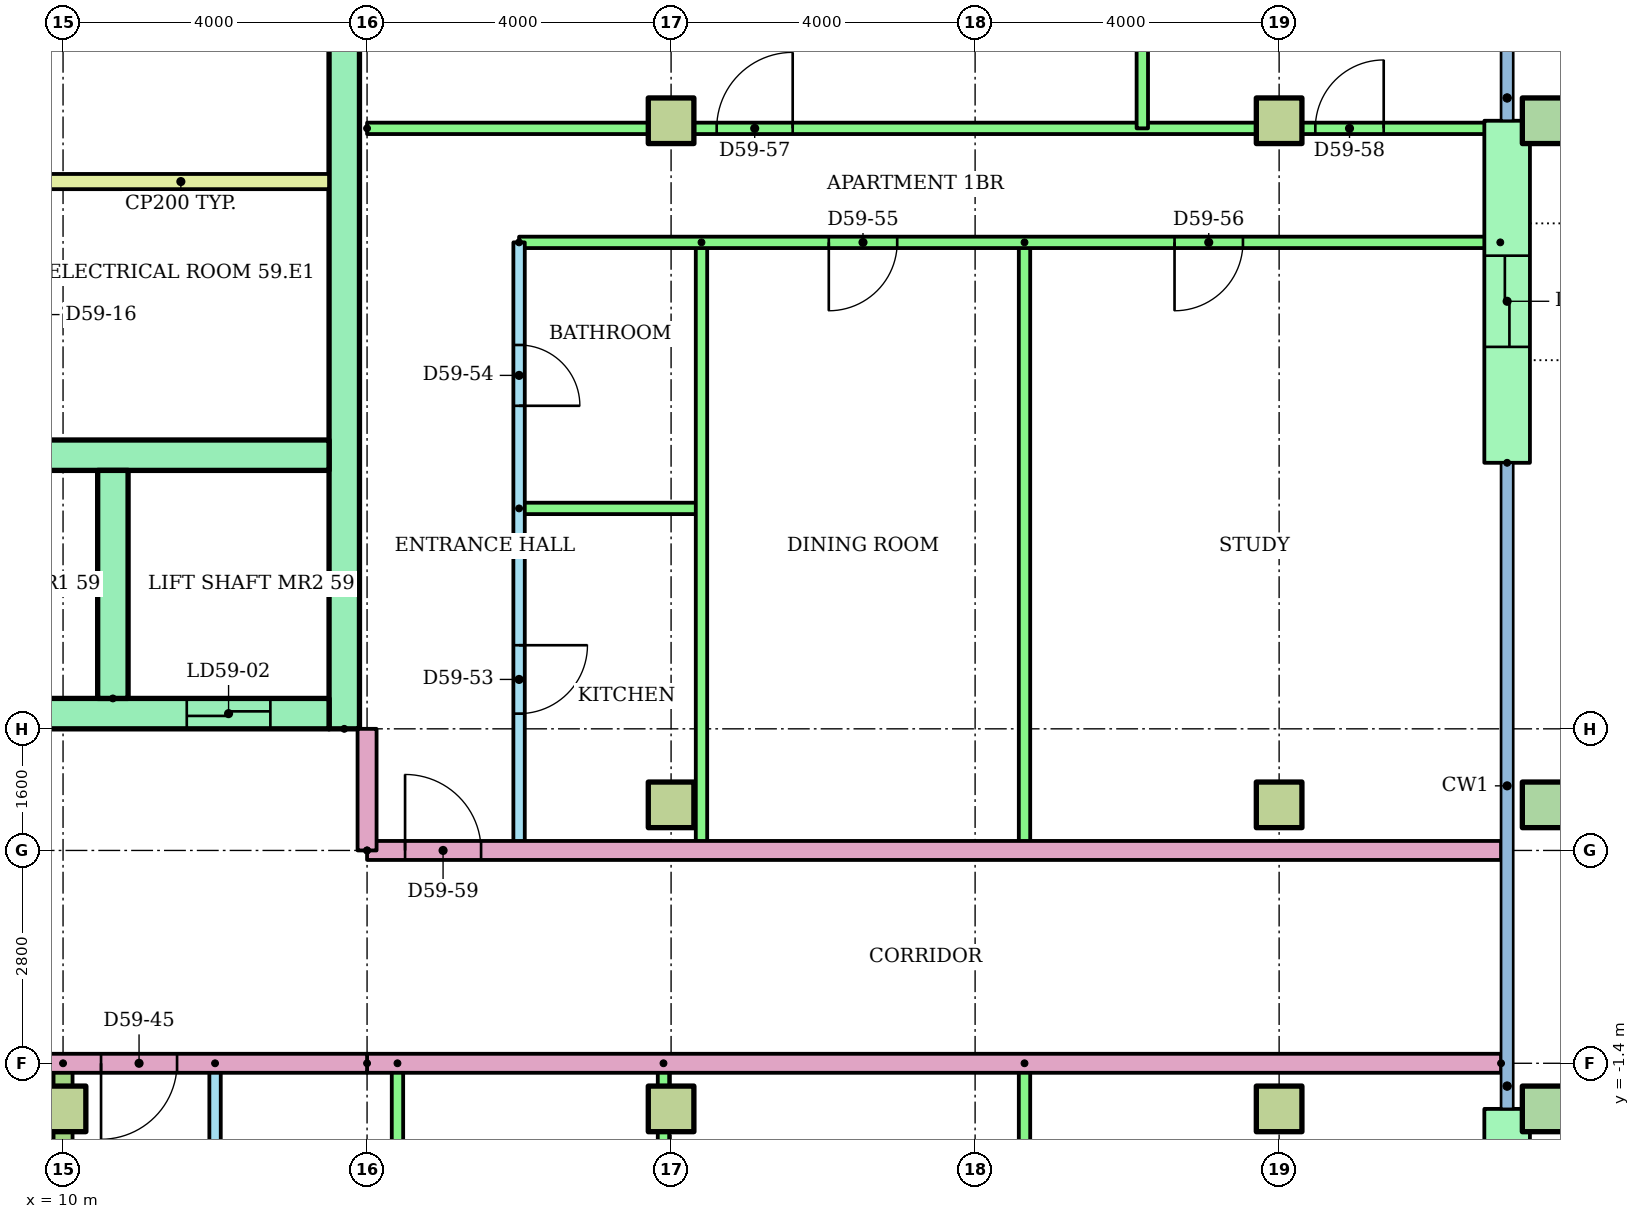
"""IFC4 building model, lengths in metres.
Left out: names, types, materials, properties, quantities, classifications, styles, units other than length and angle.
Written with IfcOpenShell. Run it as: python <this file> out.ifc"""

import sys

from ifc_helpers import new_model, si_unit, direction, frame, frame_2d, origin, origin_2d, place, context, subcontext, project, spatial, rectangle, hollow_rectangle, extrude, element, fill, save


model = new_model("IFC4")
c1 = context("Model", 3, precision=1e-05, world=origin(), true_north=direction((0.0, 1.0)))
c2 = subcontext(c1, "Body", "Model", "MODEL_VIEW")
j1 = project(units=[si_unit("LENGTHUNIT", "METRE"), si_unit("PLANEANGLEUNIT", "RADIAN")], contexts=[c1])
p1 = place(None, origin())
s1 = spatial("IfcSite", under=j1, at=p1, CompositionType="ELEMENT")
p2 = place(p1, origin())
s2 = spatial("IfcBuilding", under=s1, at=p2, CompositionType="ELEMENT")
p3 = place(p2, frame((0.0, 0.0, 226.8)))
s3 = spatial("IfcBuildingStorey", under=s2, at=p3, CompositionType="ELEMENT", Elevation=226.8)
for number, where in (
    (1, (10.0, -2.0, 0.0)),
    (2, (18.0, -2.0, 0.0)),
    (3, (26.0, -2.0, 0.0)),
):
    element("IfcColumn", number, at=place(p3, frame(where)), inside=s3, PredefinedType="COLUMN", context=c2, shape_type="SweptSolid", body=[
        extrude(rectangle(XDim=0.6, YDim=0.6, at=origin_2d()), origin(), (0.0, 0.0, 1.0), 3.2),
    ])
p4 = place(p3, frame((29.5, -2.0, 0.0)))
e4 = element("IfcColumn", 4, at=p4, inside=s3, PredefinedType="COLUMN", context=c2, shape_type="SweptSolid", body=[
    extrude(hollow_rectangle(XDim=0.6, YDim=0.6, WallThickness=0.03, at=origin_2d()), origin(), (0.0, 0.0, 1.0), 3.2),
])
for number, where in (
    (5, (18.0, 2.0, 0.0)),
    (6, (26.0, 2.0, 0.0)),
):
    element("IfcColumn", number, at=place(p3, frame(where)), inside=s3, PredefinedType="COLUMN", context=c2, shape_type="SweptSolid", body=[
        extrude(rectangle(XDim=0.6, YDim=0.6, at=origin_2d()), origin(), (0.0, 0.0, 1.0), 3.2),
    ])
p5 = place(p3, frame((29.5, 2.0, 0.0)))
e7 = element("IfcColumn", 7, at=p5, inside=s3, PredefinedType="COLUMN", context=c2, shape_type="SweptSolid", body=[
    extrude(hollow_rectangle(XDim=0.6, YDim=0.6, WallThickness=0.03, at=origin_2d()), origin(), (0.0, 0.0, 1.0), 3.2),
])
for number, where in (
    (8, (18.0, 11.0, 0.0)),
    (9, (26.0, 11.0, 0.0)),
):
    element("IfcColumn", number, at=place(p3, frame(where)), inside=s3, PredefinedType="COLUMN", context=c2, shape_type="SweptSolid", body=[
        extrude(rectangle(XDim=0.6, YDim=0.6, at=origin_2d()), origin(), (0.0, 0.0, 1.0), 3.2),
    ])
p6 = place(p3, frame((29.5, 11.0, 0.0)))
e10 = element("IfcColumn", 10, at=p6, inside=s3, PredefinedType="COLUMN", context=c2, shape_type="SweptSolid", body=[
    extrude(hollow_rectangle(XDim=0.6, YDim=0.6, WallThickness=0.03, at=origin_2d()), origin(), (0.0, 0.0, 1.0), 3.2),
])
p7 = place(p3, frame((29.0, -5.7, 0.0), z_axis=(0.0, 0.0, 1.0), x_axis=(0.0, 1.0, 0.0)))
e11 = element("IfcWall", 11, at=p7, inside=s3, PredefinedType="STANDARD", context=c2, shape_type="SweptSolid", body=[
    extrude(rectangle(XDim=3.7, YDim=0.6, at=frame_2d((1.85, 0.0))), origin(), (0.0, 0.0, 1.0), 2.92),
])
p8 = place(p7, frame((1.25, 0.0, 0.0)))
e12 = element("IfcOpeningElement", 12, at=p8, cuts=e11, PredefinedType="OPENING", context=c2, shape_type="SweptSolid", body=[
    extrude(rectangle(XDim=1.2, YDim=2.1, at=frame_2d((0.6, 1.05))), frame((0.0, 0.31, 0.0), z_axis=(0.0, -1.0, 0.0), x_axis=(1.0, 0.0, 0.0)), (0.0, 0.0, 1.0), 0.62),
])
p9 = place(p3, frame((29.0, 6.5, 0.0), z_axis=(0.0, 0.0, 1.0), x_axis=(0.0, 1.0, 0.0)))
e13 = element("IfcWall", 13, at=p9, inside=s3, PredefinedType="STANDARD", context=c2, shape_type="SweptSolid", body=[
    extrude(rectangle(XDim=4.5, YDim=0.6, at=frame_2d((2.25, 0.0))), origin(), (0.0, 0.0, 1.0), 2.92),
])
p10 = place(p9, frame((1.525, 0.0, 0.0)))
e14 = element("IfcOpeningElement", 14, at=p10, cuts=e13, PredefinedType="OPENING", context=c2, shape_type="SweptSolid", body=[
    extrude(rectangle(XDim=1.2, YDim=2.1, at=frame_2d((0.6, 1.05))), frame((0.0, 0.31, 0.0), z_axis=(0.0, -1.0, 0.0), x_axis=(1.0, 0.0, 0.0)), (0.0, 0.0, 1.0), 0.62),
])
p11 = place(p3, frame((13.7, 3.0, 0.0), z_axis=(0.0, 0.0, 1.0), x_axis=(0.0, 1.0, 0.0)))
e15 = element("IfcWall", 15, at=p11, inside=s3, PredefinedType="SHEAR", context=c2, shape_type="SweptSolid", body=[
    extrude(rectangle(XDim=17.0, YDim=0.4, at=frame_2d((8.5, 0.0))), origin(), (0.0, 0.0, 1.0), 2.92),
])
p12 = place(p3, frame((-13.5, 3.2, 0.0)))
e16 = element("IfcWall", 16, at=p12, inside=s3, PredefinedType="SHEAR", context=c2, shape_type="SweptSolid", body=[
    extrude(rectangle(XDim=27.0, YDim=0.4, at=frame_2d((13.5, 0.0))), origin(), (0.0, 0.0, 1.0), 2.92),
])
p13 = place(p12, frame((22.083, 0.0, 0.0)))
e17 = element("IfcOpeningElement", 17, at=p13, cuts=e16, PredefinedType="OPENING", context=c2, shape_type="SweptSolid", body=[
    extrude(rectangle(XDim=1.1, YDim=2.1, at=frame_2d((0.55, 1.05))), frame((0.0, 0.21, 0.0), z_axis=(0.0, -1.0, 0.0), x_axis=(1.0, 0.0, 0.0)), (0.0, 0.0, 1.0), 0.42),
])
p14 = place(p12, frame((25.128, 0.0, 0.0)))
e18 = element("IfcOpeningElement", 18, at=p14, cuts=e16, PredefinedType="OPENING", context=c2, shape_type="SweptSolid", body=[
    extrude(rectangle(XDim=1.1, YDim=2.1, at=frame_2d((0.55, 1.05))), frame((0.0, 0.21, 0.0), z_axis=(0.0, -1.0, 0.0), x_axis=(1.0, 0.0, 0.0)), (0.0, 0.0, 1.0), 0.42),
])
p15 = place(p12, frame((12.6, 0.0, 0.0)))
e19 = element("IfcOpeningElement", 19, at=p15, cuts=e16, PredefinedType="OPENING", context=c2, shape_type="SweptSolid", body=[
    extrude(rectangle(XDim=1.8, YDim=2.1, at=frame_2d((0.9, 1.05))), frame((0.0, 0.21, 0.0), z_axis=(0.0, -1.0, 0.0), x_axis=(1.0, 0.0, 0.0)), (0.0, 0.0, 1.0), 0.42),
])
p16 = place(p3, frame((1.522, 6.6, 0.0)))
e20 = element("IfcWall", 20, at=p16, inside=s3, PredefinedType="SHEAR", context=c2, shape_type="SweptSolid", body=[
    extrude(rectangle(XDim=11.978, YDim=0.4, at=frame_2d((5.989, 0.0))), origin(), (0.0, 0.0, 1.0), 2.92),
])
p17 = place(p16, frame((1.022, 0.0, 0.0)))
e21 = element("IfcOpeningElement", 21, at=p17, cuts=e20, PredefinedType="OPENING", context=c2, shape_type="SweptSolid", body=[
    extrude(rectangle(XDim=1.0, YDim=2.1, at=frame_2d((0.5, 1.05))), frame((0.0, 0.21, 0.0), z_axis=(0.0, -1.0, 0.0), x_axis=(1.0, 0.0, 0.0)), (0.0, 0.0, 1.0), 0.42),
])
p18 = place(p16, frame((4.067, 0.0, 0.0)))
e22 = element("IfcOpeningElement", 22, at=p18, cuts=e20, PredefinedType="OPENING", context=c2, shape_type="SweptSolid", body=[
    extrude(rectangle(XDim=1.0, YDim=2.1, at=frame_2d((0.5, 1.05))), frame((0.0, 0.21, 0.0), z_axis=(0.0, -1.0, 0.0), x_axis=(1.0, 0.0, 0.0)), (0.0, 0.0, 1.0), 0.42),
])
p19 = place(p3, frame((10.656, 3.4, 0.0), z_axis=(0.0, 0.0, 1.0), x_axis=(0.0, 1.0, 0.0)))
e23 = element("IfcWall", 23, at=p19, inside=s3, PredefinedType="SHEAR", context=c2, shape_type="SweptSolid", body=[
    extrude(rectangle(XDim=3.0, YDim=0.4, at=frame_2d((1.5, 0.0))), origin(), (0.0, 0.0, 1.0), 2.92),
])
p20 = place(p3, frame((9.6, 10.2, 0.0)))
e24 = element("IfcWall", 24, at=p20, inside=s3, PredefinedType="PARTITIONING", context=c2, shape_type="SweptSolid", body=[
    extrude(rectangle(XDim=3.9, YDim=0.2, at=frame_2d((1.95, 0.0))), origin(), (0.0, 0.0, 1.0), 2.92),
])
p21 = place(p3, frame((12.0, -1.4, 0.0), z_axis=(0.0, 0.0, 1.0), x_axis=(0.0, -1.0, 0.0)))
e25 = element("IfcWall", 25, at=p21, inside=s3, PredefinedType="PARTITIONING", context=c2, shape_type="SweptSolid", body=[
    extrude(rectangle(XDim=5.6, YDim=0.15, at=frame_2d((2.8, 0.0))), origin(), (0.0, 0.0, 1.0), 2.4),
])
p22 = place(p21, frame((1.05, 0.0, 0.0)))
e26 = element("IfcOpeningElement", 26, at=p22, cuts=e25, PredefinedType="OPENING", context=c2, shape_type="SweptSolid", body=[
    extrude(rectangle(XDim=0.9, YDim=2.1, at=frame_2d((0.45, 1.05))), frame((0.0, 0.085, 0.0), z_axis=(0.0, -1.0, 0.0), x_axis=(1.0, 0.0, 0.0)), (0.0, 0.0, 1.0), 0.17),
])
p23 = place(p21, frame((3.9, 0.0, 0.0)))
e27 = element("IfcOpeningElement", 27, at=p23, cuts=e25, PredefinedType="OPENING", context=c2, shape_type="SweptSolid", body=[
    extrude(rectangle(XDim=0.8, YDim=2.1, at=frame_2d((0.4, 1.05))), frame((0.0, 0.085, 0.0), z_axis=(0.0, -1.0, 0.0), x_axis=(1.0, 0.0, 0.0)), (0.0, 0.0, 1.0), 0.17),
])
for number, where, z_axis, x_axis in (
    (28, (14.4, -1.4, 0.0), (0.0, 0.0, 1.0), (0.0, -1.0, 0.0)),
    (29, (17.9, -1.4, 0.0), (0.0, 0.0, 1.0), (0.0, -1.0, 0.0)),
    (30, (22.65, -1.4, 0.0), (0.0, 0.0, 1.0), (0.0, -1.0, 0.0)),
):
    element("IfcWall", number, at=place(p3, frame(where, z_axis=z_axis, x_axis=x_axis)), inside=s3, PredefinedType="PARTITIONING", context=c2, shape_type="SweptSolid", body=[
        extrude(rectangle(XDim=5.6, YDim=0.15, at=frame_2d((2.8, 0.0))), origin(), (0.0, 0.0, 1.0), 2.4),
    ])
p24 = place(p3, frame((10.0, -1.4, 0.0), z_axis=(0.0, 0.0, 1.0), x_axis=(0.0, -1.0, 0.0)))
e31 = element("IfcWall", 31, at=p24, inside=s3, PredefinedType="PARTITIONING", context=c2, shape_type="SweptSolid", body=[
    extrude(rectangle(XDim=15.11, YDim=0.25, at=frame_2d((7.555, 0.0))), origin(), (0.0, 0.0, 1.0), 2.4),
])
p25 = place(p3, frame((28.92, -1.4, 0.0), z_axis=(0.0, 0.0, 1.0), x_axis=(-1.0, 0.0, 0.0)))
e32 = element("IfcWall", 32, at=p25, inside=s3, PredefinedType="PARTITIONING", context=c2, shape_type="SweptSolid", body=[
    extrude(rectangle(XDim=14.92, YDim=0.25, at=frame_2d((7.46, 0.0))), origin(), (0.0, 0.0, 1.0), 2.4),
])
p26 = place(p3, frame((16.0, 9.4, 0.0), z_axis=(0.0, 0.0, 1.0), x_axis=(0.0, -1.0, 0.0)))
e33 = element("IfcWall", 33, at=p26, inside=s3, PredefinedType="PARTITIONING", context=c2, shape_type="SweptSolid", body=[
    extrude(rectangle(XDim=8.0, YDim=0.15, at=frame_2d((4.0, 0.0))), origin(), (0.0, 0.0, 1.0), 2.4),
])
p27 = place(p26, frame((5.3, 0.0, 0.0)))
e34 = element("IfcOpeningElement", 34, at=p27, cuts=e33, PredefinedType="OPENING", context=c2, shape_type="SweptSolid", body=[
    extrude(rectangle(XDim=0.9, YDim=2.1, at=frame_2d((0.45, 1.05))), frame((0.0, 0.085, 0.0), z_axis=(0.0, -1.0, 0.0), x_axis=(1.0, 0.0, 0.0)), (0.0, 0.0, 1.0), 0.17),
])
p28 = place(p26, frame((1.35, 0.0, 0.0)))
e35 = element("IfcOpeningElement", 35, at=p28, cuts=e33, PredefinedType="OPENING", context=c2, shape_type="SweptSolid", body=[
    extrude(rectangle(XDim=0.8, YDim=2.1, at=frame_2d((0.4, 1.05))), frame((0.0, 0.085, 0.0), z_axis=(0.0, -1.0, 0.0), x_axis=(1.0, 0.0, 0.0)), (0.0, 0.0, 1.0), 0.17),
])
p29 = place(p3, frame((16.0, 5.9, 0.0)))
e36 = element("IfcWall", 36, at=p29, inside=s3, PredefinedType="PARTITIONING", context=c2, shape_type="SweptSolid", body=[
    extrude(rectangle(XDim=2.4, YDim=0.15, at=frame_2d((1.2, 0.0))), origin(), (0.0, 0.0, 1.0), 2.4),
])
for number, where, z_axis, x_axis in (
    (37, (18.4, 9.4, 0.0), (0.0, 0.0, 1.0), (0.0, -1.0, 0.0)),
    (38, (22.65, 9.4, 0.0), (0.0, 0.0, 1.0), (0.0, -1.0, 0.0)),
):
    element("IfcWall", number, at=place(p3, frame(where, z_axis=z_axis, x_axis=x_axis)), inside=s3, PredefinedType="PARTITIONING", context=c2, shape_type="SweptSolid", body=[
        extrude(rectangle(XDim=8.0, YDim=0.15, at=frame_2d((4.0, 0.0))), origin(), (0.0, 0.0, 1.0), 2.4),
    ])
p30 = place(p3, frame((28.91, 9.4, 0.0), z_axis=(0.0, 0.0, 1.0), x_axis=(-1.0, 0.0, 0.0)))
e39 = element("IfcWall", 39, at=p30, inside=s3, PredefinedType="PARTITIONING", context=c2, shape_type="SweptSolid", body=[
    extrude(rectangle(XDim=12.91, YDim=0.15, at=frame_2d((6.455, 0.0))), origin(), (0.0, 0.0, 1.0), 2.4),
])
p31 = place(p30, frame((7.935, 0.0, 0.0)))
e40 = element("IfcOpeningElement", 40, at=p31, cuts=e39, PredefinedType="OPENING", context=c2, shape_type="SweptSolid", body=[
    extrude(rectangle(XDim=0.9, YDim=2.1, at=frame_2d((0.45, 1.05))), frame((0.0, 0.085, 0.0), z_axis=(0.0, -1.0, 0.0), x_axis=(1.0, 0.0, 0.0)), (0.0, 0.0, 1.0), 0.17),
])
p32 = place(p30, frame((3.386, 0.0, 0.0)))
e41 = element("IfcOpeningElement", 41, at=p32, cuts=e39, PredefinedType="OPENING", context=c2, shape_type="SweptSolid", body=[
    extrude(rectangle(XDim=0.9, YDim=2.1, at=frame_2d((0.45, 1.05))), frame((0.0, 0.085, 0.0), z_axis=(0.0, -1.0, 0.0), x_axis=(1.0, 0.0, 0.0)), (0.0, 0.0, 1.0), 0.17),
])
p33 = place(p3, frame((14.0, 10.9, 0.0)))
e42 = element("IfcWall", 42, at=p33, inside=s3, PredefinedType="PARTITIONING", context=c2, shape_type="SweptSolid", body=[
    extrude(rectangle(XDim=14.91, YDim=0.15, at=frame_2d((7.455, 0.0))), origin(), (0.0, 0.0, 1.0), 2.4),
])
p34 = place(p33, frame((4.6, 0.0, 0.0)))
e43 = element("IfcOpeningElement", 43, at=p34, cuts=e42, PredefinedType="OPENING", context=c2, shape_type="SweptSolid", body=[
    extrude(rectangle(XDim=1.0, YDim=2.1, at=frame_2d((0.5, 1.05))), frame((0.0, 0.085, 0.0), z_axis=(0.0, -1.0, 0.0), x_axis=(1.0, 0.0, 0.0)), (0.0, 0.0, 1.0), 0.17),
])
p35 = place(p33, frame((12.476, 0.0, 0.0)))
e44 = element("IfcOpeningElement", 44, at=p35, cuts=e42, PredefinedType="OPENING", context=c2, shape_type="SweptSolid", body=[
    extrude(rectangle(XDim=0.9, YDim=2.1, at=frame_2d((0.45, 1.05))), frame((0.0, 0.085, 0.0), z_axis=(0.0, -1.0, 0.0), x_axis=(1.0, 0.0, 0.0)), (0.0, 0.0, 1.0), 0.17),
])
p36 = place(p3, frame((24.2, 17.12, 0.0), z_axis=(0.0, 0.0, 1.0), x_axis=(0.0, -1.0, 0.0)))
e45 = element("IfcWall", 45, at=p36, inside=s3, PredefinedType="PARTITIONING", context=c2, shape_type="SweptSolid", body=[
    extrude(rectangle(XDim=6.22, YDim=0.15, at=frame_2d((3.11, 0.0))), origin(), (0.0, 0.0, 1.0), 2.4),
])
p37 = place(p3, frame((14.0, 1.4, 0.0)))
e46 = element("IfcWall", 46, at=p37, inside=s3, PredefinedType="PARTITIONING", context=c2, shape_type="SweptSolid", body=[
    extrude(rectangle(XDim=14.92, YDim=0.25, at=frame_2d((7.46, 0.0))), origin(), (0.0, 0.0, 1.0), 2.4),
])
p38 = place(p37, frame((0.5, 0.0, 0.0)))
e47 = element("IfcOpeningElement", 47, at=p38, cuts=e46, PredefinedType="OPENING", context=c2, shape_type="SweptSolid", body=[
    extrude(rectangle(XDim=1.0, YDim=2.1, at=frame_2d((0.5, 1.05))), frame((0.0, 0.135, 0.0), z_axis=(0.0, -1.0, 0.0), x_axis=(1.0, 0.0, 0.0)), (0.0, 0.0, 1.0), 0.27),
])
p39 = place(p3, frame((14.0, -1.4, 0.0), z_axis=(0.0, 0.0, 1.0), x_axis=(-1.0, 0.0, 0.0)))
e48 = element("IfcWall", 48, at=p39, inside=s3, PredefinedType="PARTITIONING", context=c2, shape_type="SweptSolid", body=[
    extrude(rectangle(XDim=28.0, YDim=0.25, at=frame_2d((14.0, 0.0))), origin(), (0.0, 0.0, 1.0), 2.4),
])
p40 = place(p39, frame((20.5, 0.0, 0.0)))
e49 = element("IfcOpeningElement", 49, at=p40, cuts=e48, PredefinedType="OPENING", context=c2, shape_type="SweptSolid", body=[
    extrude(rectangle(XDim=1.0, YDim=2.1, at=frame_2d((0.5, 1.05))), frame((0.0, 0.135, 0.0), z_axis=(0.0, -1.0, 0.0), x_axis=(1.0, 0.0, 0.0)), (0.0, 0.0, 1.0), 0.27),
])
p41 = place(p39, frame((18.5, 0.0, 0.0)))
e50 = element("IfcOpeningElement", 50, at=p41, cuts=e48, PredefinedType="OPENING", context=c2, shape_type="SweptSolid", body=[
    extrude(rectangle(XDim=1.0, YDim=2.1, at=frame_2d((0.5, 1.05))), frame((0.0, 0.135, 0.0), z_axis=(0.0, -1.0, 0.0), x_axis=(1.0, 0.0, 0.0)), (0.0, 0.0, 1.0), 0.27),
])
p42 = place(p39, frame((2.5, 0.0, 0.0)))
e51 = element("IfcOpeningElement", 51, at=p42, cuts=e48, PredefinedType="OPENING", context=c2, shape_type="SweptSolid", body=[
    extrude(rectangle(XDim=1.0, YDim=2.1, at=frame_2d((0.5, 1.05))), frame((0.0, 0.135, 0.0), z_axis=(0.0, -1.0, 0.0), x_axis=(1.0, 0.0, 0.0)), (0.0, 0.0, 1.0), 0.27),
])
p43 = place(p3, frame((14.0, 1.4, 0.0), z_axis=(0.0, 0.0, 1.0), x_axis=(0.0, 1.0, 0.0)))
e52 = element("IfcWall", 52, at=p43, inside=s3, PredefinedType="PARTITIONING", context=c2, shape_type="SweptSolid", body=[
    extrude(rectangle(XDim=1.6, YDim=0.25, at=frame_2d((0.8, 0.0))), origin(), (0.0, 0.0, 1.0), 2.4),
])
p44 = place(p14, origin())
e53 = element("IfcDoor", 53, at=p44, inside=s3, OperationType="SLIDING_TO_LEFT", PredefinedType="DOOR", context=c2, shape_type="SweptSolid", body=[
    extrude(rectangle(XDim=1.1, YDim=2.1, at=frame_2d((0.55, 1.05))), frame((0.0, 0.025, 0.0), z_axis=(0.0, -1.0, 0.0), x_axis=(1.0, 0.0, 0.0)), (0.0, 0.0, 1.0), 0.05),
])
fill(e18, e53)
p45 = place(p42, origin())
e54 = element("IfcDoor", 54, at=p45, inside=s3, OperationType="SINGLE_SWING_RIGHT", PredefinedType="DOOR", context=c2, shape_type="SweptSolid", body=[
    extrude(rectangle(XDim=1.0, YDim=2.1, at=frame_2d((0.5, 1.05))), frame((0.0, 0.025, 0.0), z_axis=(0.0, -1.0, 0.0), x_axis=(1.0, 0.0, 0.0)), (0.0, 0.0, 1.0), 0.05),
])
fill(e51, e54)
p46 = place(p27, origin())
e55 = element("IfcDoor", 55, at=p46, inside=s3, OperationType="SINGLE_SWING_LEFT", PredefinedType="DOOR", context=c2, shape_type="SweptSolid", body=[
    extrude(rectangle(XDim=0.9, YDim=2.1, at=frame_2d((0.45, 1.05))), frame((0.0, 0.025, 0.0), z_axis=(0.0, -1.0, 0.0), x_axis=(1.0, 0.0, 0.0)), (0.0, 0.0, 1.0), 0.05),
])
fill(e34, e55)
p47 = place(p28, origin())
e56 = element("IfcDoor", 56, at=p47, inside=s3, OperationType="SINGLE_SWING_RIGHT", PredefinedType="DOOR", context=c2, shape_type="SweptSolid", body=[
    extrude(rectangle(XDim=0.8, YDim=2.1, at=frame_2d((0.4, 1.05))), frame((0.0, 0.025, 0.0), z_axis=(0.0, -1.0, 0.0), x_axis=(1.0, 0.0, 0.0)), (0.0, 0.0, 1.0), 0.05),
])
fill(e35, e56)
p48 = place(p31, origin())
e57 = element("IfcDoor", 57, at=p48, inside=s3, OperationType="SINGLE_SWING_RIGHT", PredefinedType="DOOR", context=c2, shape_type="SweptSolid", body=[
    extrude(rectangle(XDim=0.9, YDim=2.1, at=frame_2d((0.45, 1.05))), frame((0.0, 0.025, 0.0), z_axis=(0.0, -1.0, 0.0), x_axis=(1.0, 0.0, 0.0)), (0.0, 0.0, 1.0), 0.05),
])
fill(e40, e57)
p49 = place(p32, origin())
e58 = element("IfcDoor", 58, at=p49, inside=s3, OperationType="SINGLE_SWING_RIGHT", PredefinedType="DOOR", context=c2, shape_type="SweptSolid", body=[
    extrude(rectangle(XDim=0.9, YDim=2.1, at=frame_2d((0.45, 1.05))), frame((0.0, 0.025, 0.0), z_axis=(0.0, -1.0, 0.0), x_axis=(1.0, 0.0, 0.0)), (0.0, 0.0, 1.0), 0.05),
])
fill(e41, e58)
p50 = place(p34, origin())
e59 = element("IfcDoor", 59, at=p50, inside=s3, OperationType="SINGLE_SWING_RIGHT", PredefinedType="DOOR", context=c2, shape_type="SweptSolid", body=[
    extrude(rectangle(XDim=1.0, YDim=2.1, at=frame_2d((0.5, 1.05))), frame((0.0, 0.025, 0.0), z_axis=(0.0, -1.0, 0.0), x_axis=(1.0, 0.0, 0.0)), (0.0, 0.0, 1.0), 0.05),
])
fill(e43, e59)
p51 = place(p35, origin())
e60 = element("IfcDoor", 60, at=p51, inside=s3, OperationType="SINGLE_SWING_RIGHT", PredefinedType="DOOR", context=c2, shape_type="SweptSolid", body=[
    extrude(rectangle(XDim=0.9, YDim=2.1, at=frame_2d((0.45, 1.05))), frame((0.0, 0.025, 0.0), z_axis=(0.0, -1.0, 0.0), x_axis=(1.0, 0.0, 0.0)), (0.0, 0.0, 1.0), 0.05),
])
fill(e44, e60)
p52 = place(p38, origin())
e61 = element("IfcDoor", 61, at=p52, inside=s3, OperationType="SINGLE_SWING_LEFT", PredefinedType="DOOR", context=c2, shape_type="SweptSolid", body=[
    extrude(rectangle(XDim=1.0, YDim=2.1, at=frame_2d((0.5, 1.05))), frame((0.0, 0.025, 0.0), z_axis=(0.0, -1.0, 0.0), x_axis=(1.0, 0.0, 0.0)), (0.0, 0.0, 1.0), 0.05),
])
fill(e47, e61)
p53 = place(p10, origin())
e62 = element("IfcDoor", 62, at=p53, inside=s3, OperationType="SLIDING_TO_LEFT", PredefinedType="DOOR", context=c2, shape_type="SweptSolid", body=[
    extrude(rectangle(XDim=1.2, YDim=2.1, at=frame_2d((0.6, 1.05))), frame((0.0, 0.025, 0.0), z_axis=(0.0, -1.0, 0.0), x_axis=(1.0, 0.0, 0.0)), (0.0, 0.0, 1.0), 0.05),
])
fill(e14, e62)
save(model, sys.argv[1])
